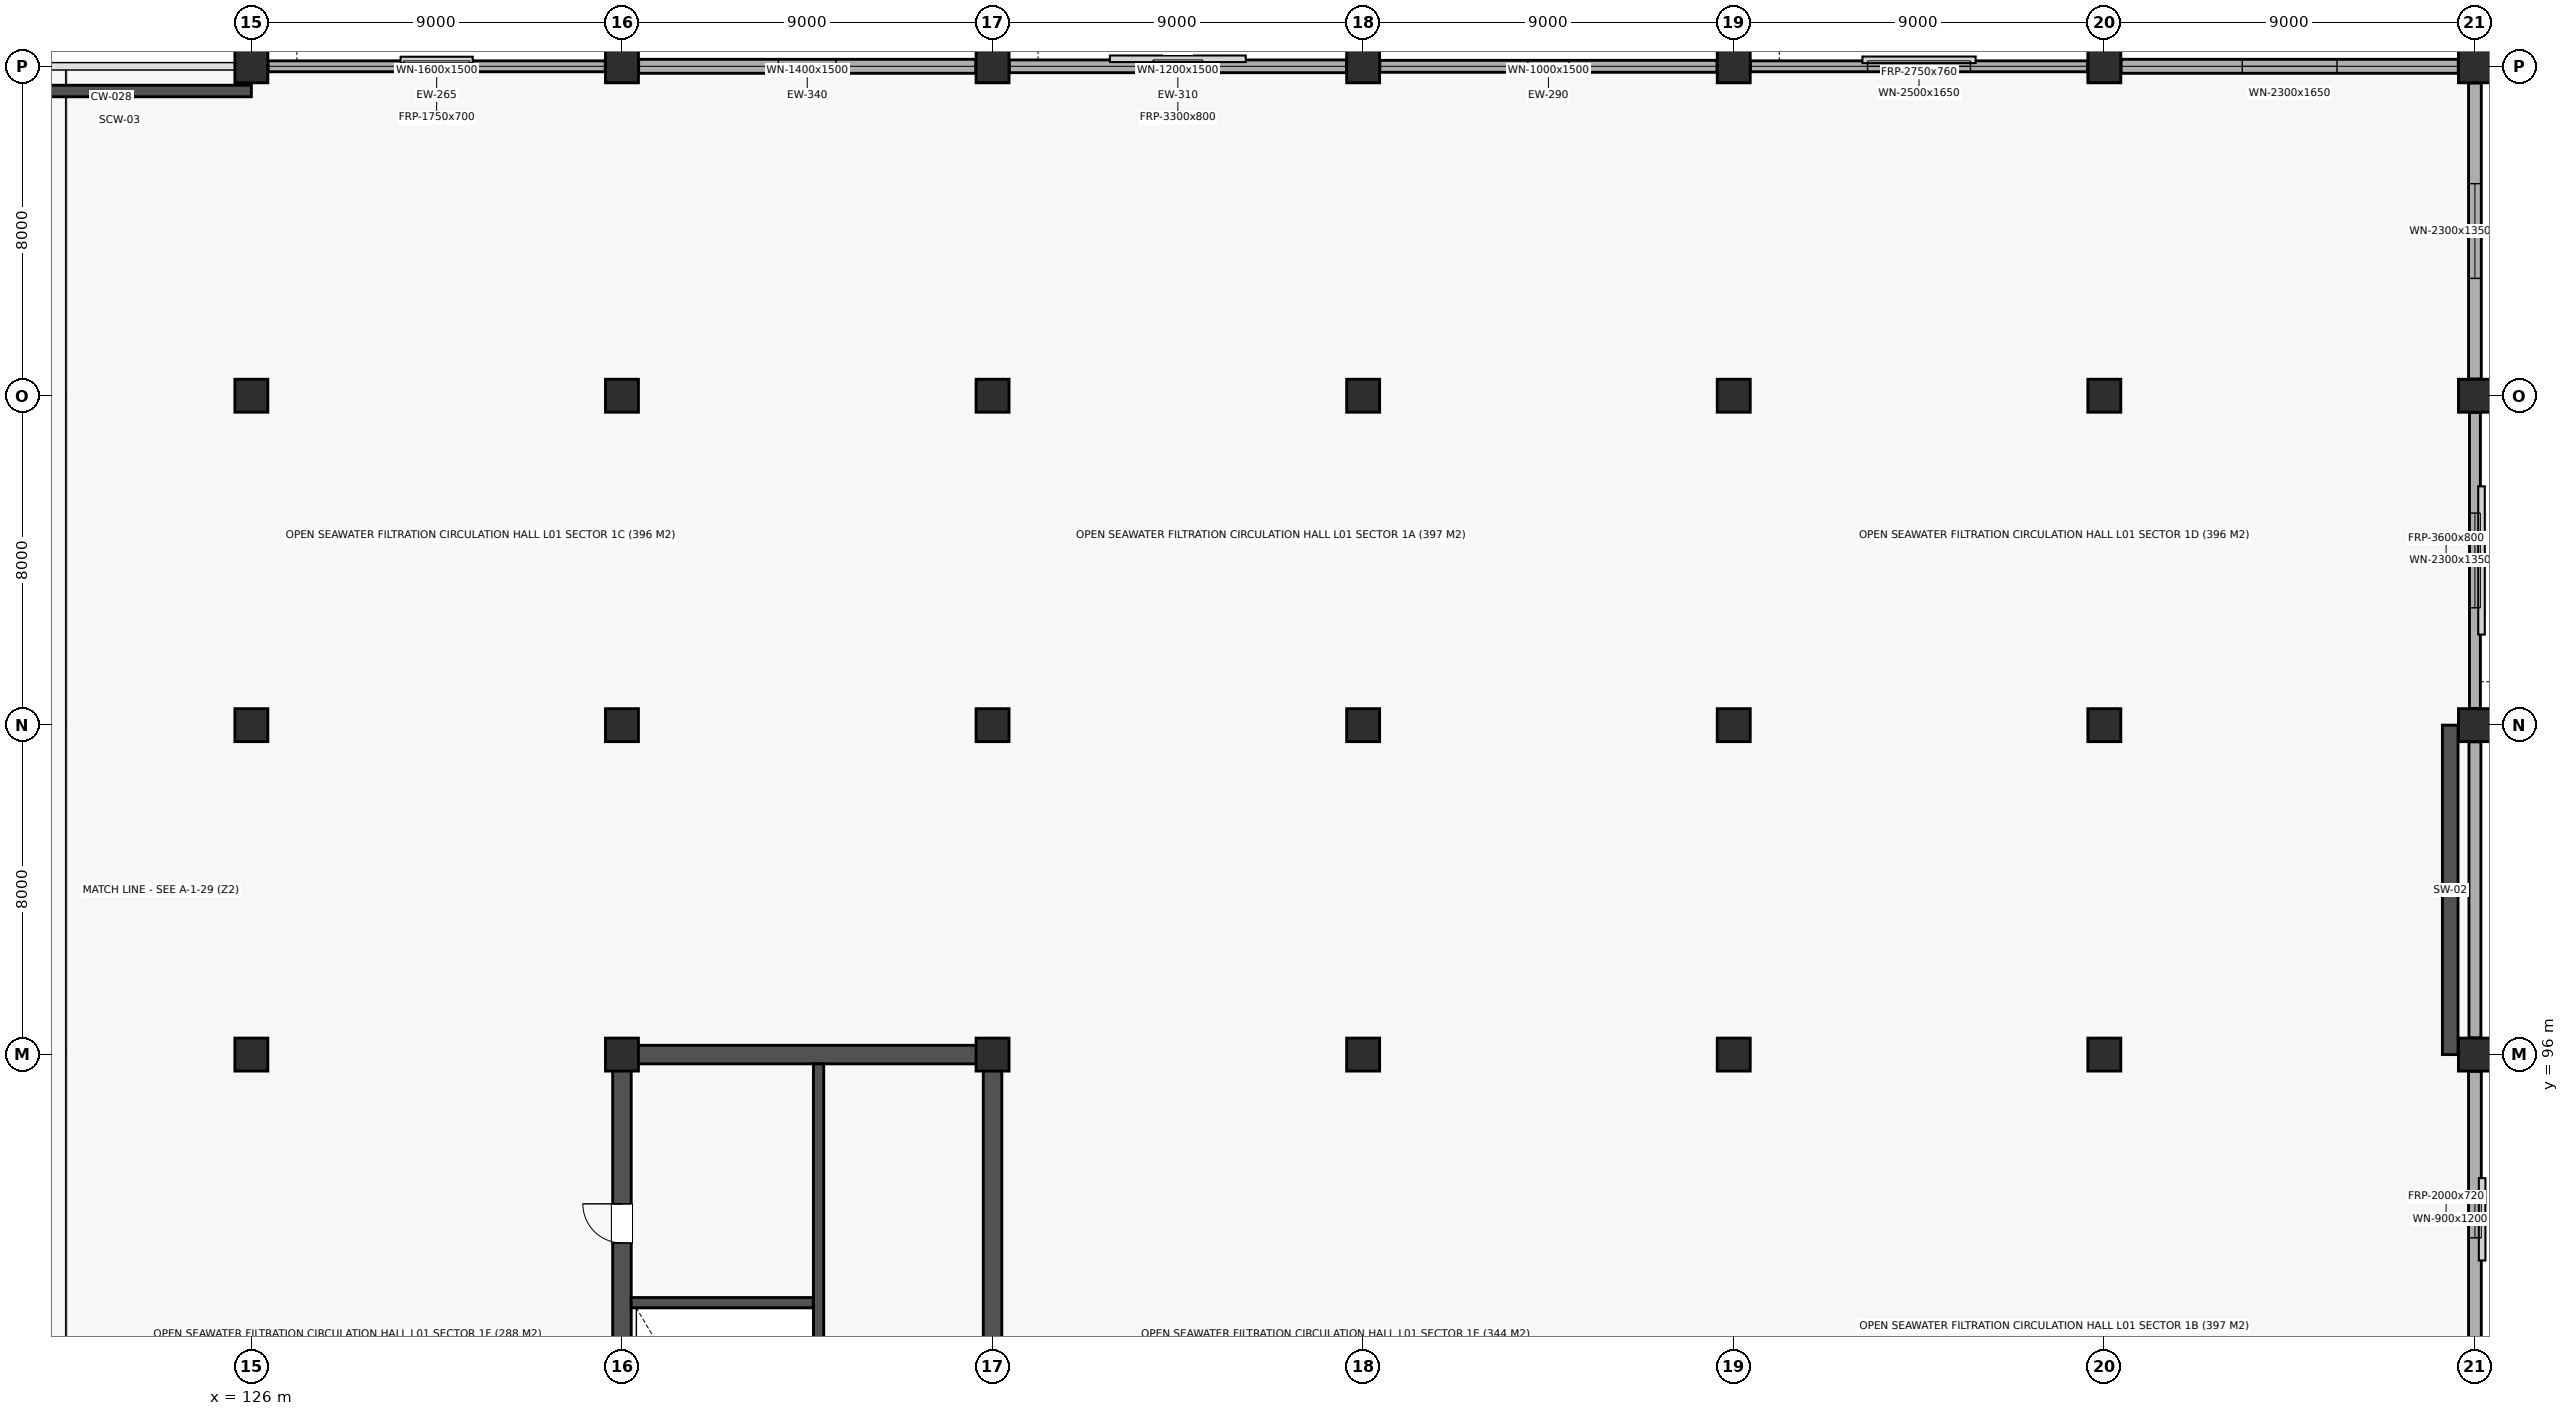
"""IFC4 building model, lengths in metres.
Left out: names, types, materials, properties, quantities, classifications, styles, units other than length and angle.
Written with IfcOpenShell. Run it as: python <this file> out.ifc"""

import sys

from ifc_helpers import new_model, si_unit, direction, frame, frame_2d, origin, origin_2d, place, context, subcontext, project, spatial, rectangle, extrude, element, fill, save


model = new_model("IFC4")
c1 = context("Model", 3, precision=1e-05, world=origin(), true_north=direction((0.0, 1.0)))
c2 = subcontext(c1, "Body", "Model", "MODEL_VIEW")
j1 = project(units=[si_unit("LENGTHUNIT", "METRE"), si_unit("PLANEANGLEUNIT", "RADIAN")], contexts=[c1])
p1 = place(None, origin())
s1 = spatial("IfcSite", under=j1, at=p1, CompositionType="ELEMENT")
p2 = place(p1, origin())
s2 = spatial("IfcBuilding", under=s1, at=p2, CompositionType="ELEMENT")
p3 = place(p2, frame((0.0, 0.0, 4.5)))
s3 = spatial("IfcBuildingStorey", under=s2, at=p3, CompositionType="ELEMENT", Elevation=4.5)
for number, where, z_axis, x_axis in (
    (1, (126.0, 96.0, 0.0), (0.0, 0.0, 1.0), (1.0, 0.0, 0.0)),
    (2, (126.0, 104.0, 0.0), (0.0, 0.0, 1.0), (1.0, 0.0, 0.0)),
    (3, (126.0, 112.0, 0.0), (0.0, 0.0, 1.0), (1.0, 0.0, 0.0)),
    (4, (126.0, 120.0, 0.0), (0.0, 0.0, 1.0), (1.0, 0.0, 0.0)),
    (5, (135.0, 96.0, 0.0), (0.0, 0.0, 1.0), (1.0, 0.0, 0.0)),
    (6, (135.0, 104.0, 0.0), (0.0, 0.0, 1.0), (1.0, 0.0, 0.0)),
    (7, (135.0, 112.0, 0.0), (0.0, 0.0, 1.0), (1.0, 0.0, 0.0)),
    (8, (135.0, 120.0, 0.0), (0.0, 0.0, 1.0), (1.0, 0.0, 0.0)),
    (9, (144.0, 96.0, 0.0), (0.0, 0.0, 1.0), (1.0, 0.0, 0.0)),
    (10, (144.0, 104.0, 0.0), (0.0, 0.0, 1.0), (1.0, 0.0, 0.0)),
    (11, (144.0, 112.0, 0.0), (0.0, 0.0, 1.0), (1.0, 0.0, 0.0)),
    (12, (144.0, 120.0, 0.0), (0.0, 0.0, 1.0), (1.0, 0.0, 0.0)),
    (13, (153.0, 96.0, 0.0), (0.0, 0.0, 1.0), (1.0, 0.0, 0.0)),
    (14, (153.0, 104.0, 0.0), (0.0, 0.0, 1.0), (1.0, 0.0, 0.0)),
    (15, (153.0, 112.0, 0.0), (0.0, 0.0, 1.0), (1.0, 0.0, 0.0)),
    (16, (153.0, 120.0, 0.0), (0.0, 0.0, 1.0), (1.0, 0.0, 0.0)),
    (17, (162.0, 96.0, 0.0), (0.0, 0.0, 1.0), (1.0, 0.0, 0.0)),
    (18, (162.0, 104.0, 0.0), (0.0, 0.0, 1.0), (1.0, 0.0, 0.0)),
    (19, (162.0, 112.0, 0.0), (0.0, 0.0, 1.0), (1.0, 0.0, 0.0)),
    (20, (162.0, 120.0, 0.0), (0.0, 0.0, 1.0), (1.0, 0.0, 0.0)),
    (21, (171.0, 96.0, 0.0), (0.0, 0.0, 1.0), (1.0, 0.0, 0.0)),
    (22, (171.0, 104.0, 0.0), (0.0, 0.0, 1.0), (1.0, 0.0, 0.0)),
    (23, (171.0, 112.0, 0.0), (0.0, 0.0, 1.0), (1.0, 0.0, 0.0)),
    (24, (171.0, 120.0, 0.0), (0.0, 0.0, 1.0), (1.0, 0.0, 0.0)),
    (25, (180.0, 96.0, 0.0), (0.0, 0.0, 1.0), (1.0, 0.0, 0.0)),
    (26, (180.0, 104.0, 0.0), (0.0, 0.0, 1.0), (1.0, 0.0, 0.0)),
    (27, (180.0, 112.0, 0.0), (0.0, 0.0, 1.0), (1.0, 0.0, 0.0)),
    (28, (180.0, 120.0, 0.0), (0.0, 0.0, 1.0), (1.0, 0.0, 0.0)),
):
    element("IfcColumn", number, at=place(p3, frame(where, z_axis=z_axis, x_axis=x_axis)), inside=s3, PredefinedType="COLUMN", context=c2, shape_type="SweptSolid", body=[
        extrude(rectangle(XDim=0.8, YDim=0.8, at=origin_2d()), origin(), (0.0, 0.0, 1.0), 4.5),
    ])
p4 = place(p3, frame((179.4, 96.0, 0.0), z_axis=(0.0, 0.0, 1.0), x_axis=(0.0, 1.0, 0.0)))
e29 = element("IfcWall", 29, at=p4, inside=s3, PredefinedType="SHEAR", context=c2, shape_type="SweptSolid", body=[
    extrude(rectangle(XDim=8.0, YDim=0.38, at=frame_2d((4.0, 0.0))), origin(), (0.0, 0.0, 1.0), 4.18),
])
p5 = place(p3, frame((117.0, 119.4, 0.0), z_axis=(0.0, 0.0, 1.0), x_axis=(1.0, 0.0, 0.0)))
e30 = element("IfcWall", 30, at=p5, inside=s3, PredefinedType="SOLIDWALL", context=c2, shape_type="SweptSolid", body=[
    extrude(rectangle(XDim=9.0, YDim=0.28, at=frame_2d((4.5, 0.0))), origin(), (0.0, 0.0, 1.0), 4.18),
])
p6 = place(p3, frame((135.225, 96.0, 0.0), z_axis=(0.0, 0.0, 1.0), x_axis=(1.0, 0.0, 0.0)))
e31 = element("IfcWall", 31, at=p6, inside=s3, PredefinedType="SHEAR", context=c2, shape_type="SweptSolid", body=[
    extrude(rectangle(XDim=8.55, YDim=0.45, at=frame_2d((4.275, 0.0))), origin(), (0.0, 0.0, 1.0), 4.18),
])
p7 = place(p3, frame((135.0, 80.225, 0.0), z_axis=(0.0, 0.0, 1.0), x_axis=(0.0, 1.0, 0.0)))
e32 = element("IfcWall", 32, at=p7, inside=s3, PredefinedType="SHEAR", context=c2, shape_type="SweptSolid", body=[
    extrude(rectangle(XDim=15.55, YDim=0.45, at=frame_2d((7.775, 0.0))), origin(), (0.0, 0.0, 1.0), 4.18),
])
p8 = place(p7, frame((11.2, 0.0, 0.0)))
e33 = element("IfcOpeningElement", 33, at=p8, cuts=e32, PredefinedType="OPENING", context=c2, shape_type="SweptSolid", body=[
    extrude(rectangle(XDim=0.95, YDim=2.1, at=frame_2d((0.475, 1.05))), frame((0.0, 0.237, 0.0), z_axis=(0.0, -1.0, 0.0), x_axis=(1.0, 0.0, 0.0)), (0.0, 0.0, 1.0), 0.474),
])
p9 = place(p3, frame((144.0, 80.225, 0.0), z_axis=(0.0, 0.0, 1.0), x_axis=(0.0, 1.0, 0.0)))
e34 = element("IfcWall", 34, at=p9, inside=s3, PredefinedType="SHEAR", context=c2, shape_type="SweptSolid", body=[
    extrude(rectangle(XDim=15.55, YDim=0.45, at=frame_2d((7.775, 0.0))), origin(), (0.0, 0.0, 1.0), 4.18),
])
p10 = place(p3, frame((139.775, 80.225, 0.0), z_axis=(0.0, 0.0, 1.0), x_axis=(0.0, 1.0, 0.0)))
e35 = element("IfcWall", 35, at=p10, inside=s3, PredefinedType="SOLIDWALL", context=c2, shape_type="SweptSolid", body=[
    extrude(rectangle(XDim=15.55, YDim=0.25, at=frame_2d((7.775, 0.0))), origin(), (0.0, 0.0, 1.0), 4.18),
])
p11 = place(p10, frame((0.45, 0.0, 0.0)))
e36 = element("IfcOpeningElement", 36, at=p11, cuts=e35, PredefinedType="OPENING", context=c2, shape_type="SweptSolid", body=[
    extrude(rectangle(XDim=1.1, YDim=2.15, at=frame_2d((0.55, 1.075))), frame((0.0, 0.137, 0.0), z_axis=(0.0, -1.0, 0.0), x_axis=(1.0, 0.0, 0.0)), (0.0, 0.0, 1.0), 0.274),
])
p12 = place(p3, frame((135.225, 89.975, 0.0), z_axis=(0.0, 0.0, 1.0), x_axis=(1.0, 0.0, 0.0)))
e37 = element("IfcWall", 37, at=p12, inside=s3, PredefinedType="SOLIDWALL", context=c2, shape_type="SweptSolid", body=[
    extrude(rectangle(XDim=4.42, YDim=0.25, at=frame_2d((2.21, 0.0))), origin(), (0.0, 0.0, 1.0), 4.18),
])
p13 = place(p3, frame((126.405, 120.0, 0.0), z_axis=(0.0, 0.0, 1.0), x_axis=(1.0, 0.0, 0.0)))
e38 = element("IfcWall", 38, at=p13, inside=s3, PredefinedType="STANDARD", context=c2, shape_type="SweptSolid", body=[
    extrude(rectangle(XDim=8.19, YDim=0.265, at=frame_2d((4.095, 0.0))), origin(), (0.0, 0.0, 1.0), 3.46),
])
p14 = place(p13, frame((3.295, 0.0, 0.85)))
e39 = element("IfcOpeningElement", 39, at=p14, cuts=e38, PredefinedType="OPENING", context=c2, shape_type="SweptSolid", body=[
    extrude(rectangle(XDim=1.6, YDim=1.5, at=frame_2d((0.8, 0.75))), frame((0.0, 0.145, 0.0), z_axis=(0.0, -1.0, 0.0), x_axis=(1.0, 0.0, 0.0)), (0.0, 0.0, 1.0), 0.289),
])
p15 = place(p3, frame((135.405, 120.0, 0.0), z_axis=(0.0, 0.0, 1.0), x_axis=(1.0, 0.0, 0.0)))
e40 = element("IfcWall", 40, at=p15, inside=s3, PredefinedType="STANDARD", context=c2, shape_type="SweptSolid", body=[
    extrude(rectangle(XDim=8.19, YDim=0.34, at=frame_2d((4.095, 0.0))), origin(), (0.0, 0.0, 1.0), 3.46),
])
p16 = place(p15, frame((3.395, 0.0, 0.85)))
e41 = element("IfcOpeningElement", 41, at=p16, cuts=e40, PredefinedType="OPENING", context=c2, shape_type="SweptSolid", body=[
    extrude(rectangle(XDim=1.4, YDim=1.5, at=frame_2d((0.7, 0.75))), frame((0.0, 0.182, 0.0), z_axis=(0.0, -1.0, 0.0), x_axis=(1.0, 0.0, 0.0)), (0.0, 0.0, 1.0), 0.364),
])
p17 = place(p3, frame((144.405, 120.0, 0.0), z_axis=(0.0, 0.0, 1.0), x_axis=(1.0, 0.0, 0.0)))
e42 = element("IfcWall", 42, at=p17, inside=s3, PredefinedType="STANDARD", context=c2, shape_type="SweptSolid", body=[
    extrude(rectangle(XDim=8.19, YDim=0.31, at=frame_2d((4.095, 0.0))), origin(), (0.0, 0.0, 1.0), 3.46),
])
p18 = place(p17, frame((3.495, 0.0, 0.85)))
e43 = element("IfcOpeningElement", 43, at=p18, cuts=e42, PredefinedType="OPENING", context=c2, shape_type="SweptSolid", body=[
    extrude(rectangle(XDim=1.2, YDim=1.5, at=frame_2d((0.6, 0.75))), frame((0.0, 0.167, 0.0), z_axis=(0.0, -1.0, 0.0), x_axis=(1.0, 0.0, 0.0)), (0.0, 0.0, 1.0), 0.334),
])
p19 = place(p3, frame((153.405, 120.0, 0.0), z_axis=(0.0, 0.0, 1.0), x_axis=(1.0, 0.0, 0.0)))
e44 = element("IfcWall", 44, at=p19, inside=s3, PredefinedType="STANDARD", context=c2, shape_type="SweptSolid", body=[
    extrude(rectangle(XDim=8.19, YDim=0.29, at=frame_2d((4.095, 0.0))), origin(), (0.0, 0.0, 1.0), 3.46),
])
p20 = place(p19, frame((3.595, 0.0, 0.85)))
e45 = element("IfcOpeningElement", 45, at=p20, cuts=e44, PredefinedType="OPENING", context=c2, shape_type="SweptSolid", body=[
    extrude(rectangle(XDim=1.0, YDim=1.5, at=frame_2d((0.5, 0.75))), frame((0.0, 0.157, 0.0), z_axis=(0.0, -1.0, 0.0), x_axis=(1.0, 0.0, 0.0)), (0.0, 0.0, 1.0), 0.314),
])
p21 = place(p3, frame((162.405, 120.0, 0.0), z_axis=(0.0, 0.0, 1.0), x_axis=(1.0, 0.0, 0.0)))
e46 = element("IfcWall", 46, at=p21, inside=s3, PredefinedType="STANDARD", context=c2, shape_type="SweptSolid", body=[
    extrude(rectangle(XDim=8.19, YDim=0.265, at=frame_2d((4.095, 0.0))), origin(), (0.0, 0.0, 1.0), 3.46),
])
p22 = place(p21, frame((2.845, 0.0, 0.85)))
e47 = element("IfcOpeningElement", 47, at=p22, cuts=e46, PredefinedType="OPENING", context=c2, shape_type="SweptSolid", body=[
    extrude(rectangle(XDim=2.5, YDim=1.65, at=frame_2d((1.25, 0.825))), frame((0.0, 0.145, 0.0), z_axis=(0.0, -1.0, 0.0), x_axis=(1.0, 0.0, 0.0)), (0.0, 0.0, 1.0), 0.289),
])
p23 = place(p3, frame((171.405, 120.0, 0.0), z_axis=(0.0, 0.0, 1.0), x_axis=(1.0, 0.0, 0.0)))
e48 = element("IfcWall", 48, at=p23, inside=s3, PredefinedType="STANDARD", context=c2, shape_type="SweptSolid", body=[
    extrude(rectangle(XDim=8.19, YDim=0.34, at=frame_2d((4.095, 0.0))), origin(), (0.0, 0.0, 1.0), 3.46),
])
p24 = place(p23, frame((2.945, 0.0, 0.85)))
e49 = element("IfcOpeningElement", 49, at=p24, cuts=e48, PredefinedType="OPENING", context=c2, shape_type="SweptSolid", body=[
    extrude(rectangle(XDim=2.3, YDim=1.65, at=frame_2d((1.15, 0.825))), frame((0.0, 0.182, 0.0), z_axis=(0.0, -1.0, 0.0), x_axis=(1.0, 0.0, 0.0)), (0.0, 0.0, 1.0), 0.364),
])
p25 = place(p3, frame((180.0, 88.405, 0.0), z_axis=(0.0, 0.0, 1.0), x_axis=(0.0, 1.0, 0.0)))
e50 = element("IfcWall", 50, at=p25, inside=s3, PredefinedType="STANDARD", context=c2, shape_type="SweptSolid", body=[
    extrude(rectangle(XDim=7.19, YDim=0.31, at=frame_2d((3.595, 0.0))), origin(), (0.0, 0.0, 1.0), 3.46),
])
p26 = place(p25, frame((3.145, 0.0, 0.85)))
e51 = element("IfcOpeningElement", 51, at=p26, cuts=e50, PredefinedType="OPENING", context=c2, shape_type="SweptSolid", body=[
    extrude(rectangle(XDim=0.9, YDim=1.2, at=frame_2d((0.45, 0.6))), frame((0.0, 0.167, 0.0), z_axis=(0.0, -1.0, 0.0), x_axis=(1.0, 0.0, 0.0)), (0.0, 0.0, 1.0), 0.334),
])
p27 = place(p3, frame((180.0, 96.405, 0.0), z_axis=(0.0, 0.0, 1.0), x_axis=(0.0, 1.0, 0.0)))
e52 = element("IfcWall", 52, at=p27, inside=s3, PredefinedType="STANDARD", context=c2, shape_type="SweptSolid", body=[
    extrude(rectangle(XDim=7.19, YDim=0.29, at=frame_2d((3.595, 0.0))), origin(), (0.0, 0.0, 1.0), 3.46),
])
p28 = place(p3, frame((180.0, 104.405, 0.0), z_axis=(0.0, 0.0, 1.0), x_axis=(0.0, 1.0, 0.0)))
e53 = element("IfcWall", 53, at=p28, inside=s3, PredefinedType="STANDARD", context=c2, shape_type="SweptSolid", body=[
    extrude(rectangle(XDim=7.19, YDim=0.265, at=frame_2d((3.595, 0.0))), origin(), (0.0, 0.0, 1.0), 3.46),
])
p29 = place(p28, frame((2.445, 0.0, 0.85)))
e54 = element("IfcOpeningElement", 54, at=p29, cuts=e53, PredefinedType="OPENING", context=c2, shape_type="SweptSolid", body=[
    extrude(rectangle(XDim=2.3, YDim=1.35, at=frame_2d((1.15, 0.675))), frame((0.0, 0.145, 0.0), z_axis=(0.0, -1.0, 0.0), x_axis=(1.0, 0.0, 0.0)), (0.0, 0.0, 1.0), 0.289),
])
p30 = place(p3, frame((180.0, 112.405, 0.0), z_axis=(0.0, 0.0, 1.0), x_axis=(0.0, 1.0, 0.0)))
e55 = element("IfcWall", 55, at=p30, inside=s3, PredefinedType="STANDARD", context=c2, shape_type="SweptSolid", body=[
    extrude(rectangle(XDim=7.19, YDim=0.31, at=frame_2d((3.595, 0.0))), origin(), (0.0, 0.0, 1.0), 3.46),
])
p31 = place(p30, frame((2.445, 0.0, 0.85)))
e56 = element("IfcOpeningElement", 56, at=p31, cuts=e55, PredefinedType="OPENING", context=c2, shape_type="SweptSolid", body=[
    extrude(rectangle(XDim=2.3, YDim=1.35, at=frame_2d((1.15, 0.675))), frame((0.0, 0.167, 0.0), z_axis=(0.0, -1.0, 0.0), x_axis=(1.0, 0.0, 0.0)), (0.0, 0.0, 1.0), 0.334),
])
p32 = place(p8, origin())
e57 = element("IfcDoor", 57, at=p32, inside=s3, OperationType="SINGLE_SWING_RIGHT", PredefinedType="DOOR", context=c2, shape_type="SweptSolid", body=[
    extrude(rectangle(XDim=0.95, YDim=2.1, at=frame_2d((0.475, 1.05))), frame((0.0, 0.025, 0.0), z_axis=(0.0, -1.0, 0.0), x_axis=(1.0, 0.0, 0.0)), (0.0, 0.0, 1.0), 0.05),
])
fill(e33, e57)
p33 = place(p14, origin())
e58 = element("IfcWindow", 58, at=p33, inside=s3, PartitioningType="SINGLE_PANEL", PredefinedType="WINDOW", context=c2, shape_type="SweptSolid", body=[
    extrude(rectangle(XDim=1.6, YDim=1.5, at=frame_2d((0.8, 0.75))), frame((0.0, 0.03, 0.0), z_axis=(0.0, -1.0, 0.0), x_axis=(1.0, 0.0, 0.0)), (0.0, 0.0, 1.0), 0.06),
])
fill(e39, e58)
p34 = place(p16, origin())
e59 = element("IfcWindow", 59, at=p34, inside=s3, PartitioningType="SINGLE_PANEL", PredefinedType="WINDOW", context=c2, shape_type="SweptSolid", body=[
    extrude(rectangle(XDim=1.4, YDim=1.5, at=frame_2d((0.7, 0.75))), frame((0.0, 0.03, 0.0), z_axis=(0.0, -1.0, 0.0), x_axis=(1.0, 0.0, 0.0)), (0.0, 0.0, 1.0), 0.06),
])
fill(e41, e59)
p35 = place(p18, origin())
e60 = element("IfcWindow", 60, at=p35, inside=s3, PartitioningType="SINGLE_PANEL", PredefinedType="WINDOW", context=c2, shape_type="SweptSolid", body=[
    extrude(rectangle(XDim=1.2, YDim=1.5, at=frame_2d((0.6, 0.75))), frame((0.0, 0.03, 0.0), z_axis=(0.0, -1.0, 0.0), x_axis=(1.0, 0.0, 0.0)), (0.0, 0.0, 1.0), 0.06),
])
fill(e43, e60)
p36 = place(p20, origin())
e61 = element("IfcWindow", 61, at=p36, inside=s3, PartitioningType="SINGLE_PANEL", PredefinedType="WINDOW", context=c2, shape_type="SweptSolid", body=[
    extrude(rectangle(XDim=1.0, YDim=1.5, at=frame_2d((0.5, 0.75))), frame((0.0, 0.03, 0.0), z_axis=(0.0, -1.0, 0.0), x_axis=(1.0, 0.0, 0.0)), (0.0, 0.0, 1.0), 0.06),
])
fill(e45, e61)
p37 = place(p22, origin())
e62 = element("IfcWindow", 62, at=p37, inside=s3, PartitioningType="SINGLE_PANEL", PredefinedType="WINDOW", context=c2, shape_type="SweptSolid", body=[
    extrude(rectangle(XDim=2.5, YDim=1.65, at=frame_2d((1.25, 0.825))), frame((0.0, 0.03, 0.0), z_axis=(0.0, -1.0, 0.0), x_axis=(1.0, 0.0, 0.0)), (0.0, 0.0, 1.0), 0.06),
])
fill(e47, e62)
p38 = place(p24, origin())
e63 = element("IfcWindow", 63, at=p38, inside=s3, PartitioningType="SINGLE_PANEL", PredefinedType="WINDOW", context=c2, shape_type="SweptSolid", body=[
    extrude(rectangle(XDim=2.3, YDim=1.65, at=frame_2d((1.15, 0.825))), frame((0.0, 0.03, 0.0), z_axis=(0.0, -1.0, 0.0), x_axis=(1.0, 0.0, 0.0)), (0.0, 0.0, 1.0), 0.06),
])
fill(e49, e63)
p39 = place(p26, origin())
e64 = element("IfcWindow", 64, at=p39, inside=s3, PartitioningType="SINGLE_PANEL", PredefinedType="WINDOW", context=c2, shape_type="SweptSolid", body=[
    extrude(rectangle(XDim=0.9, YDim=1.2, at=frame_2d((0.45, 0.6))), frame((0.0, 0.03, 0.0), z_axis=(0.0, -1.0, 0.0), x_axis=(1.0, 0.0, 0.0)), (0.0, 0.0, 1.0), 0.06),
])
fill(e51, e64)
p40 = place(p29, origin())
e65 = element("IfcWindow", 65, at=p40, inside=s3, PartitioningType="SINGLE_PANEL", PredefinedType="WINDOW", context=c2, shape_type="SweptSolid", body=[
    extrude(rectangle(XDim=2.3, YDim=1.35, at=frame_2d((1.15, 0.675))), frame((0.0, 0.03, 0.0), z_axis=(0.0, -1.0, 0.0), x_axis=(1.0, 0.0, 0.0)), (0.0, 0.0, 1.0), 0.06),
])
fill(e54, e65)
p41 = place(p31, origin())
e66 = element("IfcWindow", 66, at=p41, inside=s3, PartitioningType="SINGLE_PANEL", PredefinedType="WINDOW", context=c2, shape_type="SweptSolid", body=[
    extrude(rectangle(XDim=2.3, YDim=1.35, at=frame_2d((1.15, 0.675))), frame((0.0, 0.03, 0.0), z_axis=(0.0, -1.0, 0.0), x_axis=(1.0, 0.0, 0.0)), (0.0, 0.0, 1.0), 0.06),
])
fill(e56, e66)
save(model, sys.argv[1])
